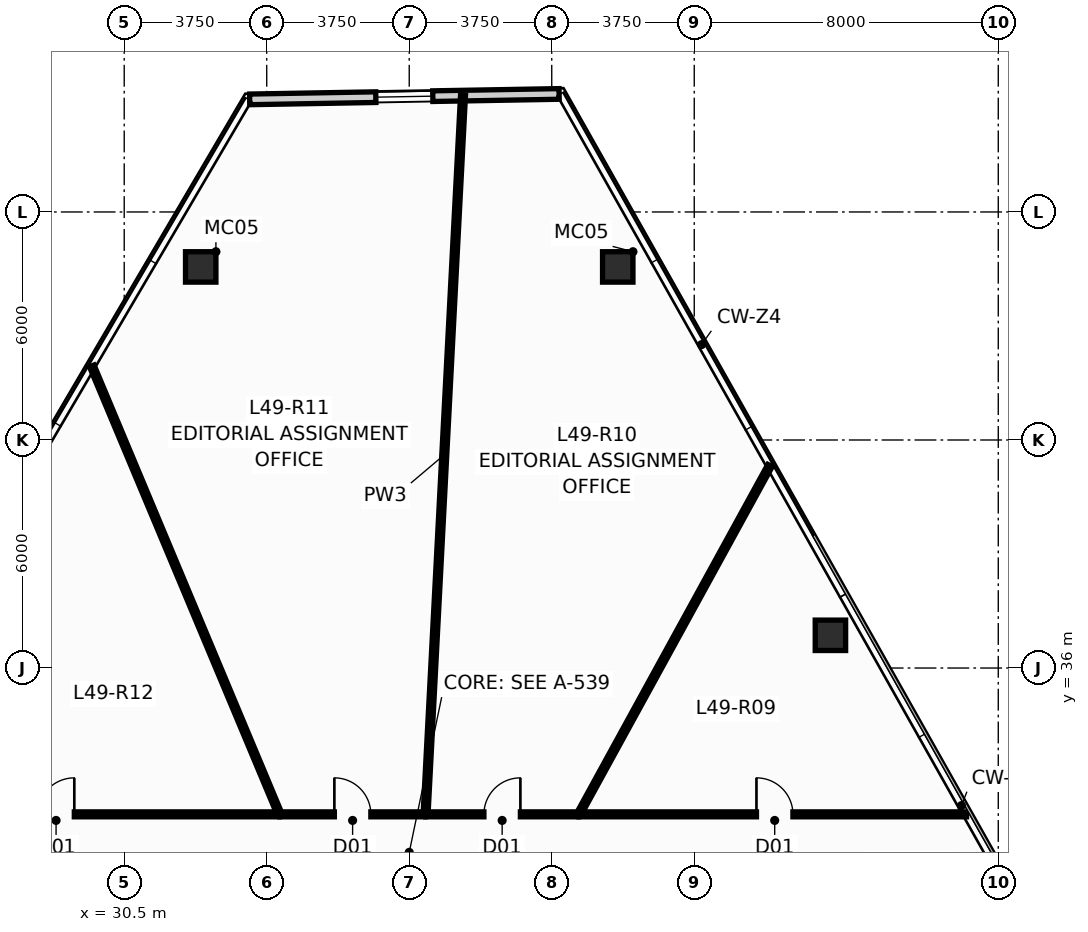
"""IFC4 building model, lengths in metres.
Left out: names, types, materials, properties, quantities, classifications, styles, units other than length and angle.
Written with IfcOpenShell. Run it as: python <this file> out.ifc"""

import sys

from ifc_helpers import new_model, si_unit, direction, frame, frame_2d, origin, origin_2d, place, context, subcontext, project, spatial, rectangle, hollow_rectangle, extrude, source, transform, mapped, element, fill, save


model = new_model("IFC4")
c1 = context("Model", 3, precision=1e-05, world=origin(), true_north=direction((0.0, 1.0)))
c2 = subcontext(c1, "Body", "Model", "MODEL_VIEW")
j1 = project(units=[si_unit("LENGTHUNIT", "METRE"), si_unit("PLANEANGLEUNIT", "RADIAN")], contexts=[c1])
p1 = place(None, origin())
s1 = spatial("IfcSite", under=j1, at=p1, CompositionType="ELEMENT")
p2 = place(p1, origin())
s2 = spatial("IfcBuilding", under=s1, at=p2, CompositionType="ELEMENT")
p3 = place(p2, frame((0.0, 0.0, 187.7)))
s3 = spatial("IfcBuildingStorey", under=s2, at=p3, CompositionType="ELEMENT", Elevation=187.7)
m1 = source(origin(), c2, "Body", "SweptSolid", [
    extrude(hollow_rectangle(XDim=0.8, YDim=0.8, WallThickness=0.045, at=origin_2d()), origin(), (0.0, 0.0, 1.0), 3.651),
])
for number, where, z_axis, x_axis in (
    (1, (43.487, 46.554, 0.0), (-0.024, 0.002, 1.0), (-0.075, -0.997, 0.0)),
    (2, (32.513, 46.554, 0.0), (0.024, 0.002, 1.0), (-0.075, 0.997, 0.0)),
):
    element("IfcColumn", number, at=place(p3, frame(where, z_axis=z_axis, x_axis=x_axis)), inside=s3, PredefinedType="COLUMN", context=c2, shape_type="MappedRepresentation", body=[
        mapped(m1, transform((0.0, 0.0, 0.0), scale=1.0)),
    ])
m2 = source(origin(), c2, "Body", "SweptSolid", [
    extrude(hollow_rectangle(XDim=0.8, YDim=0.8, WallThickness=0.045, at=origin_2d()), origin(), (0.0, 0.0, 1.0), 3.651),
])
p4 = place(p3, frame((49.083, 36.861, 0.0), z_axis=(-0.01939269685, -0.00601842316, 0.999793829693), x_axis=(0.296399214872, -0.955064136811, 0.0)))
e3 = element("IfcColumn", 3, at=p4, inside=s3, PredefinedType="COLUMN", context=c2, shape_type="MappedRepresentation", body=[
    mapped(m2, transform((0.0, 0.0, 0.0), scale=1.0)),
])
p5 = place(p3, frame((33.801, 50.962, 0.0), z_axis=(0.0, 0.0, 1.0), x_axis=(0.999845698957, 0.017566396222, 0.0)))
e4 = element("IfcWall", 4, at=p5, inside=s3, PredefinedType="STANDARD", context=c2, shape_type="SweptSolid", body=[
    extrude(rectangle(XDim=8.144, YDim=0.28, at=frame_2d((4.072, 0.0))), origin(), (0.0, 0.0, 1.0), 3.4),
])
p6 = place(p5, frame((3.32, 0.0, 0.9)))
e5 = element("IfcOpeningElement", 5, at=p6, cuts=e4, PredefinedType="OPENING", context=c2, shape_type="SweptSolid", body=[
    extrude(rectangle(XDim=1.5, YDim=1.8, at=frame_2d((0.75, 0.9))), frame((0.0, 0.152, 0.0), z_axis=(0.0, -1.0, 0.0), x_axis=(1.0, 0.0, 0.0)), (0.0, 0.0, 1.0), 0.304),
])
p7 = place(p3, frame((38.43, 32.155, 0.0), z_axis=(0.0, 0.0, 1.0), x_axis=(0.052020200387, 0.998646032762, 0.0)))
e6 = element("IfcWall", 6, at=p7, inside=s3, PredefinedType="PARTITIONING", context=c2, shape_type="SweptSolid", body=[
    extrude(rectangle(XDim=18.937, YDim=0.13, at=frame_2d((9.469, 0.0))), origin(), (0.0, 0.0, 1.0), 3.4),
])
p8 = place(p3, frame((29.647, 43.948, 0.0), z_axis=(0.0, 0.0, 1.0), x_axis=(0.386428615237, -0.922319318526, 0.0)))
e7 = element("IfcWall", 7, at=p8, inside=s3, PredefinedType="PARTITIONING", context=c2, shape_type="SweptSolid", body=[
    extrude(rectangle(XDim=12.787, YDim=0.13, at=frame_2d((6.393, 0.0))), origin(), (0.0, 0.0, 1.0), 3.4),
])
p9 = place(p3, frame((22.719, 32.15, 0.0), z_axis=(0.0, 0.0, 1.0), x_axis=(1.0, 0.0, 0.0)))
e8 = element("IfcWall", 8, at=p9, inside=s3, PredefinedType="PARTITIONING", context=c2, shape_type="SweptSolid", body=[
    extrude(rectangle(XDim=11.866, YDim=0.13, at=frame_2d((5.933, 0.0))), origin(), (0.0, 0.0, 1.0), 3.4),
])
p10 = place(p9, frame((5.508, 0.0, 0.0)))
e9 = element("IfcOpeningElement", 9, at=p10, cuts=e8, PredefinedType="OPENING", context=c2, shape_type="SweptSolid", body=[
    extrude(rectangle(XDim=0.96, YDim=2.15, at=frame_2d((0.48, 1.075))), frame((0.0, 0.077, 0.0), z_axis=(0.0, -1.0, 0.0), x_axis=(1.0, 0.0, 0.0)), (0.0, 0.0, 1.0), 0.154),
])
p11 = place(p3, frame((42.462, 32.154, 0.0), z_axis=(0.0, 0.0, 1.0), x_axis=(0.48091595193, 0.876766700542, 0.0)))
e10 = element("IfcWall", 10, at=p11, inside=s3, PredefinedType="PARTITIONING", context=c2, shape_type="SweptSolid", body=[
    extrude(rectangle(XDim=10.461, YDim=0.13, at=frame_2d((5.23, 0.0))), origin(), (0.0, 0.0, 1.0), 3.4),
])
p12 = place(p3, frame((42.465, 32.15, 0.0), z_axis=(0.0, 0.0, 1.0), x_axis=(1.0, 0.0, 0.0)))
e11 = element("IfcWall", 11, at=p12, inside=s3, PredefinedType="PARTITIONING", context=c2, shape_type="SweptSolid", body=[
    extrude(rectangle(XDim=10.2, YDim=0.13, at=frame_2d((5.1, 0.0))), origin(), (0.0, 0.0, 1.0), 3.4),
])
p13 = place(p12, frame((4.672, 0.0, 0.0)))
e12 = element("IfcOpeningElement", 12, at=p13, cuts=e11, PredefinedType="OPENING", context=c2, shape_type="SweptSolid", body=[
    extrude(rectangle(XDim=0.96, YDim=2.15, at=frame_2d((0.48, 1.075))), frame((0.0, 0.077, 0.0), z_axis=(0.0, -1.0, 0.0), x_axis=(1.0, 0.0, 0.0)), (0.0, 0.0, 1.0), 0.154),
])
p14 = place(p3, frame((38.435, 32.15, 0.0), z_axis=(0.0, 0.0, 1.0), x_axis=(1.0, 0.0, 0.0)))
e13 = element("IfcWall", 13, at=p14, inside=s3, PredefinedType="PARTITIONING", context=c2, shape_type="SweptSolid", body=[
    extrude(rectangle(XDim=4.02, YDim=0.13, at=frame_2d((2.01, 0.0))), origin(), (0.0, 0.0, 1.0), 3.4),
])
p15 = place(p14, frame((1.53, 0.0, 0.0)))
e14 = element("IfcOpeningElement", 14, at=p15, cuts=e13, PredefinedType="OPENING", context=c2, shape_type="SweptSolid", body=[
    extrude(rectangle(XDim=0.96, YDim=2.15, at=frame_2d((0.48, 1.075))), frame((0.0, 0.077, 0.0), z_axis=(0.0, -1.0, 0.0), x_axis=(1.0, 0.0, 0.0)), (0.0, 0.0, 1.0), 0.154),
])
p16 = place(p3, frame((34.595, 32.15, 0.0), z_axis=(0.0, 0.0, 1.0), x_axis=(1.0, 0.0, 0.0)))
e15 = element("IfcWall", 15, at=p16, inside=s3, PredefinedType="PARTITIONING", context=c2, shape_type="SweptSolid", body=[
    extrude(rectangle(XDim=3.83, YDim=0.13, at=frame_2d((1.915, 0.0))), origin(), (0.0, 0.0, 1.0), 3.4),
])
p17 = place(p16, frame((1.435, 0.0, 0.0)))
e16 = element("IfcOpeningElement", 16, at=p17, cuts=e15, PredefinedType="OPENING", context=c2, shape_type="SweptSolid", body=[
    extrude(rectangle(XDim=0.96, YDim=2.15, at=frame_2d((0.48, 1.075))), frame((0.0, 0.077, 0.0), z_axis=(0.0, -1.0, 0.0), x_axis=(1.0, 0.0, 0.0)), (0.0, 0.0, 1.0), 0.154),
])
p18 = place(p6, origin())
e17 = element("IfcWindow", 17, at=p18, inside=s3, PartitioningType="SINGLE_PANEL", PredefinedType="WINDOW", context=c2, shape_type="SweptSolid", body=[
    extrude(rectangle(XDim=1.5, YDim=1.8, at=frame_2d((0.75, 0.9))), frame((0.0, 0.03, 0.0), z_axis=(0.0, -1.0, 0.0), x_axis=(1.0, 0.0, 0.0)), (0.0, 0.0, 1.0), 0.06),
])
fill(e5, e17)
p19 = place(p10, origin())
e18 = element("IfcDoor", 18, at=p19, inside=s3, OperationType="SINGLE_SWING_RIGHT", PredefinedType="DOOR", context=c2, shape_type="SweptSolid", body=[
    extrude(rectangle(XDim=0.96, YDim=2.15, at=frame_2d((0.48, 1.075))), frame((0.0, 0.025, 0.0), z_axis=(0.0, -1.0, 0.0), x_axis=(1.0, 0.0, 0.0)), (0.0, 0.0, 1.0), 0.05),
])
fill(e9, e18)
p20 = place(p13, origin())
e19 = element("IfcDoor", 19, at=p20, inside=s3, OperationType="SINGLE_SWING_LEFT", PredefinedType="DOOR", context=c2, shape_type="SweptSolid", body=[
    extrude(rectangle(XDim=0.96, YDim=2.15, at=frame_2d((0.48, 1.075))), frame((0.0, 0.025, 0.0), z_axis=(0.0, -1.0, 0.0), x_axis=(1.0, 0.0, 0.0)), (0.0, 0.0, 1.0), 0.05),
])
fill(e12, e19)
p21 = place(p15, origin())
e20 = element("IfcDoor", 20, at=p21, inside=s3, OperationType="SINGLE_SWING_RIGHT", PredefinedType="DOOR", context=c2, shape_type="SweptSolid", body=[
    extrude(rectangle(XDim=0.96, YDim=2.15, at=frame_2d((0.48, 1.075))), frame((0.0, 0.025, 0.0), z_axis=(0.0, -1.0, 0.0), x_axis=(1.0, 0.0, 0.0)), (0.0, 0.0, 1.0), 0.05),
])
fill(e14, e20)
p22 = place(p17, origin())
e21 = element("IfcDoor", 21, at=p22, inside=s3, OperationType="SINGLE_SWING_LEFT", PredefinedType="DOOR", context=c2, shape_type="SweptSolid", body=[
    extrude(rectangle(XDim=0.96, YDim=2.15, at=frame_2d((0.48, 1.075))), frame((0.0, 0.025, 0.0), z_axis=(0.0, -1.0, 0.0), x_axis=(1.0, 0.0, 0.0)), (0.0, 0.0, 1.0), 0.05),
])
fill(e16, e21)
save(model, sys.argv[1])
